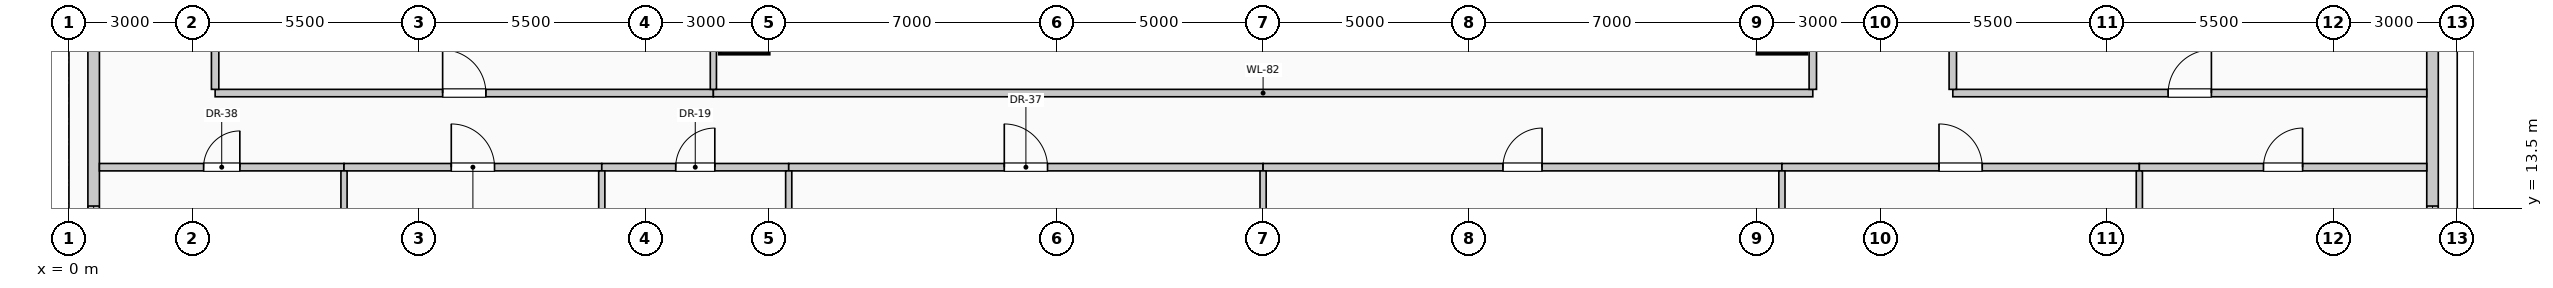
"""IFC4 building model, lengths in metres.
Left out: names, types, materials, properties, quantities, classifications, styles, units other than length and angle.
Written with IfcOpenShell. Run it as: python <this file> out.ifc"""

import sys

from ifc_helpers import new_model, si_unit, direction, frame, frame_2d, origin, origin_2d, place, context, subcontext, project, spatial, rectangle, extrude, element, fill, save


model = new_model("IFC4")
c1 = context("Model", 3, precision=1e-05, world=origin(), true_north=direction((0.0, 1.0)))
c2 = subcontext(c1, "Body", "Model", "MODEL_VIEW")
j1 = project(units=[si_unit("LENGTHUNIT", "METRE"), si_unit("PLANEANGLEUNIT", "RADIAN")], contexts=[c1])
p1 = place(None, origin())
s1 = spatial("IfcSite", under=j1, at=p1, CompositionType="ELEMENT")
p2 = place(p1, origin())
s2 = spatial("IfcBuilding", under=s1, at=p2, CompositionType="ELEMENT")
p3 = place(p2, frame((0.0, 0.0, 50.6)))
s3 = spatial("IfcBuildingStorey", under=s2, at=p3, CompositionType="ELEMENT", Elevation=50.6)
for number, where, z_axis, x_axis in (
    (1, (16.4, 18.0, 0.0), (0.0, 0.0, 1.0), (1.0, 0.0, 0.0)),
    (2, (41.6, 18.0, 0.0), (0.0, 0.0, 1.0), (1.0, 0.0, 0.0)),
):
    element("IfcColumn", number, at=place(p3, frame(where, z_axis=z_axis, x_axis=x_axis)), inside=s3, PredefinedType="COLUMN", context=c2, shape_type="SweptSolid", body=[
        extrude(rectangle(XDim=1.2, YDim=1.5, at=origin_2d()), origin(), (0.0, 0.0, 1.0), 4.0),
    ])
p4 = place(p3, frame((0.6, 10.47, 0.0), z_axis=(0.0, 0.0, 1.0), x_axis=(0.0, 1.0, 0.0)))
e3 = element("IfcWall", 3, at=p4, inside=s3, PredefinedType="SOLIDWALL", context=c2, shape_type="SweptSolid", body=[
    extrude(rectangle(XDim=7.06, YDim=0.28, at=frame_2d((3.53, 0.0))), origin(), (0.0, 0.0, 1.0), 2.85),
])
p5 = place(p4, frame((0.887, 0.0, 0.5)))
e4 = element("IfcOpeningElement", 4, at=p5, cuts=e3, PredefinedType="OPENING", context=c2, shape_type="SweptSolid", body=[
    extrude(rectangle(XDim=2.2, YDim=1.95, at=frame_2d((1.1, 0.975))), frame((0.0, 0.15, 0.0), z_axis=(0.0, -1.0, 0.0), x_axis=(1.0, 0.0, 0.0)), (0.0, 0.0, 1.0), 0.3),
])
p6 = place(p3, frame((57.4, 17.53, 0.0), z_axis=(0.0, 0.0, 1.0), x_axis=(0.0, -1.0, 0.0)))
e5 = element("IfcWall", 5, at=p6, inside=s3, PredefinedType="SOLIDWALL", context=c2, shape_type="SweptSolid", body=[
    extrude(rectangle(XDim=7.06, YDim=0.28, at=frame_2d((3.53, 0.0))), origin(), (0.0, 0.0, 1.0), 2.85),
])
p7 = place(p6, frame((3.973, 0.0, 0.5)))
e6 = element("IfcOpeningElement", 6, at=p7, cuts=e5, PredefinedType="OPENING", context=c2, shape_type="SweptSolid", body=[
    extrude(rectangle(XDim=2.2, YDim=1.95, at=frame_2d((1.1, 0.975))), frame((0.0, 0.15, 0.0), z_axis=(0.0, -1.0, 0.0), x_axis=(1.0, 0.0, 0.0)), (0.0, 0.0, 1.0), 0.3),
])
p8 = place(p3, frame((0.74, 14.5, 0.0), z_axis=(0.0, 0.0, 1.0), x_axis=(1.0, 0.0, 0.0)))
e7 = element("IfcWall", 7, at=p8, inside=s3, PredefinedType="PARTITIONING", context=c2, shape_type="SweptSolid", body=[
    extrude(rectangle(XDim=5.94, YDim=0.18, at=frame_2d((2.97, 0.0))), origin(), (0.0, 0.0, 1.0), 3.7),
])
p9 = place(p8, frame((2.53, 0.0, 0.0)))
e8 = element("IfcOpeningElement", 8, at=p9, cuts=e7, PredefinedType="OPENING", context=c2, shape_type="SweptSolid", body=[
    extrude(rectangle(XDim=0.88, YDim=2.1, at=frame_2d((0.44, 1.05))), frame((0.0, 0.1, 0.0), z_axis=(0.0, -1.0, 0.0), x_axis=(1.0, 0.0, 0.0)), (0.0, 0.0, 1.0), 0.2),
])
p10 = place(p3, frame((6.68, 14.5, 0.0), z_axis=(0.0, 0.0, 1.0), x_axis=(1.0, 0.0, 0.0)))
e9 = element("IfcWall", 9, at=p10, inside=s3, PredefinedType="PARTITIONING", context=c2, shape_type="SweptSolid", body=[
    extrude(rectangle(XDim=6.26, YDim=0.18, at=frame_2d((3.13, 0.0))), origin(), (0.0, 0.0, 1.0), 3.7),
])
p11 = place(p10, frame((2.605, 0.0, 0.0)))
e10 = element("IfcOpeningElement", 10, at=p11, cuts=e9, PredefinedType="OPENING", context=c2, shape_type="SweptSolid", body=[
    extrude(rectangle(XDim=1.05, YDim=2.15, at=frame_2d((0.525, 1.075))), frame((0.0, 0.1, 0.0), z_axis=(0.0, -1.0, 0.0), x_axis=(1.0, 0.0, 0.0)), (0.0, 0.0, 1.0), 0.2),
])
p12 = place(p3, frame((12.94, 14.5, 0.0), z_axis=(0.0, 0.0, 1.0), x_axis=(1.0, 0.0, 0.0)))
e11 = element("IfcWall", 11, at=p12, inside=s3, PredefinedType="PARTITIONING", context=c2, shape_type="SweptSolid", body=[
    extrude(rectangle(XDim=4.54, YDim=0.18, at=frame_2d((2.27, 0.0))), origin(), (0.0, 0.0, 1.0), 3.7),
])
p13 = place(p12, frame((1.795, 0.0, 0.0)))
e12 = element("IfcOpeningElement", 12, at=p13, cuts=e11, PredefinedType="OPENING", context=c2, shape_type="SweptSolid", body=[
    extrude(rectangle(XDim=0.95, YDim=2.15, at=frame_2d((0.475, 1.075))), frame((0.0, 0.1, 0.0), z_axis=(0.0, -1.0, 0.0), x_axis=(1.0, 0.0, 0.0)), (0.0, 0.0, 1.0), 0.2),
])
p14 = place(p3, frame((17.48, 14.5, 0.0), z_axis=(0.0, 0.0, 1.0), x_axis=(1.0, 0.0, 0.0)))
e13 = element("IfcWall", 13, at=p14, inside=s3, PredefinedType="PARTITIONING", context=c2, shape_type="SweptSolid", body=[
    extrude(rectangle(XDim=11.52, YDim=0.18, at=frame_2d((5.76, 0.0))), origin(), (0.0, 0.0, 1.0), 3.7),
])
p15 = place(p14, frame((5.235, 0.0, 0.0)))
e14 = element("IfcOpeningElement", 14, at=p15, cuts=e13, PredefinedType="OPENING", context=c2, shape_type="SweptSolid", body=[
    extrude(rectangle(XDim=1.05, YDim=2.15, at=frame_2d((0.525, 1.075))), frame((0.0, 0.1, 0.0), z_axis=(0.0, -1.0, 0.0), x_axis=(1.0, 0.0, 0.0)), (0.0, 0.0, 1.0), 0.2),
])
p16 = place(p3, frame((29.0, 14.5, 0.0), z_axis=(0.0, 0.0, 1.0), x_axis=(1.0, 0.0, 0.0)))
e15 = element("IfcWall", 15, at=p16, inside=s3, PredefinedType="PARTITIONING", context=c2, shape_type="SweptSolid", body=[
    extrude(rectangle(XDim=12.6, YDim=0.18, at=frame_2d((6.3, 0.0))), origin(), (0.0, 0.0, 1.0), 3.7),
])
p17 = place(p16, frame((5.825, 0.0, 0.0)))
e16 = element("IfcOpeningElement", 16, at=p17, cuts=e15, PredefinedType="OPENING", context=c2, shape_type="SweptSolid", body=[
    extrude(rectangle(XDim=0.95, YDim=2.15, at=frame_2d((0.475, 1.075))), frame((0.0, 0.1, 0.0), z_axis=(0.0, -1.0, 0.0), x_axis=(1.0, 0.0, 0.0)), (0.0, 0.0, 1.0), 0.2),
])
p18 = place(p3, frame((41.6, 14.5, 0.0), z_axis=(0.0, 0.0, 1.0), x_axis=(1.0, 0.0, 0.0)))
e17 = element("IfcWall", 17, at=p18, inside=s3, PredefinedType="PARTITIONING", context=c2, shape_type="SweptSolid", body=[
    extrude(rectangle(XDim=8.68, YDim=0.18, at=frame_2d((4.34, 0.0))), origin(), (0.0, 0.0, 1.0), 3.7),
])
p19 = place(p18, frame((3.815, 0.0, 0.0)))
e18 = element("IfcOpeningElement", 18, at=p19, cuts=e17, PredefinedType="OPENING", context=c2, shape_type="SweptSolid", body=[
    extrude(rectangle(XDim=1.05, YDim=2.15, at=frame_2d((0.525, 1.075))), frame((0.0, 0.1, 0.0), z_axis=(0.0, -1.0, 0.0), x_axis=(1.0, 0.0, 0.0)), (0.0, 0.0, 1.0), 0.2),
])
p20 = place(p3, frame((50.28, 14.5, 0.0), z_axis=(0.0, 0.0, 1.0), x_axis=(1.0, 0.0, 0.0)))
e19 = element("IfcWall", 19, at=p20, inside=s3, PredefinedType="PARTITIONING", context=c2, shape_type="SweptSolid", body=[
    extrude(rectangle(XDim=6.98, YDim=0.18, at=frame_2d((3.49, 0.0))), origin(), (0.0, 0.0, 1.0), 3.7),
])
p21 = place(p20, frame((3.015, 0.0, 0.0)))
e20 = element("IfcOpeningElement", 20, at=p21, cuts=e19, PredefinedType="OPENING", context=c2, shape_type="SweptSolid", body=[
    extrude(rectangle(XDim=0.95, YDim=2.15, at=frame_2d((0.475, 1.075))), frame((0.0, 0.1, 0.0), z_axis=(0.0, -1.0, 0.0), x_axis=(1.0, 0.0, 0.0)), (0.0, 0.0, 1.0), 0.2),
])
p22 = place(p3, frame((3.55, 16.3, 0.0), z_axis=(0.0, 0.0, 1.0), x_axis=(1.0, 0.0, 0.0)))
e21 = element("IfcWall", 21, at=p22, inside=s3, PredefinedType="PARTITIONING", context=c2, shape_type="SweptSolid", body=[
    extrude(rectangle(XDim=12.1, YDim=0.18, at=frame_2d((6.05, 0.0))), origin(), (0.0, 0.0, 1.0), 3.7),
])
p23 = place(p22, frame((5.525, 0.0, 0.0)))
e22 = element("IfcOpeningElement", 22, at=p23, cuts=e21, PredefinedType="OPENING", context=c2, shape_type="SweptSolid", body=[
    extrude(rectangle(XDim=1.05, YDim=2.15, at=frame_2d((0.525, 1.075))), frame((0.0, 0.1, 0.0), z_axis=(0.0, -1.0, 0.0), x_axis=(1.0, 0.0, 0.0)), (0.0, 0.0, 1.0), 0.2),
])
p24 = place(p3, frame((15.65, 16.3, 0.0), z_axis=(0.0, 0.0, 1.0), x_axis=(1.0, 0.0, 0.0)))
e23 = element("IfcWall", 23, at=p24, inside=s3, PredefinedType="PARTITIONING", context=c2, shape_type="SweptSolid", body=[
    extrude(rectangle(XDim=26.7, YDim=0.18, at=frame_2d((13.35, 0.0))), origin(), (0.0, 0.0, 1.0), 3.7),
])
p25 = place(p3, frame((45.75, 16.3, 0.0), z_axis=(0.0, 0.0, 1.0), x_axis=(1.0, 0.0, 0.0)))
e24 = element("IfcWall", 24, at=p25, inside=s3, PredefinedType="PARTITIONING", context=c2, shape_type="SweptSolid", body=[
    extrude(rectangle(XDim=11.51, YDim=0.18, at=frame_2d((5.755, 0.0))), origin(), (0.0, 0.0, 1.0), 3.7),
])
p26 = place(p25, frame((5.23, 0.0, 0.0)))
e25 = element("IfcOpeningElement", 25, at=p26, cuts=e24, PredefinedType="OPENING", context=c2, shape_type="SweptSolid", body=[
    extrude(rectangle(XDim=1.05, YDim=2.15, at=frame_2d((0.525, 1.075))), frame((0.0, 0.1, 0.0), z_axis=(0.0, -1.0, 0.0), x_axis=(1.0, 0.0, 0.0)), (0.0, 0.0, 1.0), 0.2),
])
p27 = place(p3, frame((3.55, 16.39, 0.0), z_axis=(0.0, 0.0, 1.0), x_axis=(0.0, 1.0, 0.0)))
e26 = element("IfcWall", 26, at=p27, inside=s3, PredefinedType="PARTITIONING", context=c2, shape_type="SweptSolid", body=[
    extrude(rectangle(XDim=3.17, YDim=0.18, at=frame_2d((1.585, 0.0))), origin(), (0.0, 0.0, 1.0), 3.7),
])
for number, where, z_axis, x_axis in (
    (27, (6.68, 0.74, 0.0), (0.0, 0.0, 1.0), (0.0, 1.0, 0.0)),
    (28, (12.94, 0.74, 0.0), (0.0, 0.0, 1.0), (0.0, 1.0, 0.0)),
):
    element("IfcWall", number, at=place(p3, frame(where, z_axis=z_axis, x_axis=x_axis)), inside=s3, PredefinedType="PARTITIONING", context=c2, shape_type="SweptSolid", body=[
        extrude(rectangle(XDim=13.67, YDim=0.15, at=frame_2d((6.835, 0.0))), origin(), (0.0, 0.0, 1.0), 3.7),
    ])
p28 = place(p3, frame((15.65, 16.39, 0.0), z_axis=(0.0, 0.0, 1.0), x_axis=(0.0, 1.0, 0.0)))
e29 = element("IfcWall", 29, at=p28, inside=s3, PredefinedType="PARTITIONING", context=c2, shape_type="SweptSolid", body=[
    extrude(rectangle(XDim=3.17, YDim=0.15, at=frame_2d((1.585, 0.0))), origin(), (0.0, 0.0, 1.0), 3.7),
])
p29 = place(p3, frame((17.48, 0.74, 0.0), z_axis=(0.0, 0.0, 1.0), x_axis=(0.0, 1.0, 0.0)))
e30 = element("IfcWall", 30, at=p29, inside=s3, PredefinedType="PARTITIONING", context=c2, shape_type="SweptSolid", body=[
    extrude(rectangle(XDim=13.67, YDim=0.15, at=frame_2d((6.835, 0.0))), origin(), (0.0, 0.0, 1.0), 3.7),
])
p30 = place(p3, frame((29.0, 1.2, 0.0), z_axis=(0.0, 0.0, 1.0), x_axis=(0.0, 1.0, 0.0)))
e31 = element("IfcWall", 31, at=p30, inside=s3, PredefinedType="PARTITIONING", context=c2, shape_type="SweptSolid", body=[
    extrude(rectangle(XDim=13.21, YDim=0.15, at=frame_2d((6.605, 0.0))), origin(), (0.0, 0.0, 1.0), 2.995),
])
p31 = place(p3, frame((41.6, 10.75, 0.0), z_axis=(0.0, 0.0, 1.0), x_axis=(0.0, 1.0, 0.0)))
e32 = element("IfcWall", 32, at=p31, inside=s3, PredefinedType="PARTITIONING", context=c2, shape_type="SweptSolid", body=[
    extrude(rectangle(XDim=3.66, YDim=0.15, at=frame_2d((1.83, 0.0))), origin(), (0.0, 0.0, 1.0), 2.995),
])
for number, where, z_axis, x_axis in (
    (33, (42.35, 16.39, 0.0), (0.0, 0.0, 1.0), (0.0, 1.0, 0.0)),
    (34, (45.75, 16.39, 0.0), (0.0, 0.0, 1.0), (0.0, 1.0, 0.0)),
):
    element("IfcWall", number, at=place(p3, frame(where, z_axis=z_axis, x_axis=x_axis)), inside=s3, PredefinedType="PARTITIONING", context=c2, shape_type="SweptSolid", body=[
        extrude(rectangle(XDim=3.17, YDim=0.18, at=frame_2d((1.585, 0.0))), origin(), (0.0, 0.0, 1.0), 3.7),
    ])
p32 = place(p3, frame((50.28, 0.74, 0.0), z_axis=(0.0, 0.0, 1.0), x_axis=(0.0, 1.0, 0.0)))
e35 = element("IfcWall", 35, at=p32, inside=s3, PredefinedType="PARTITIONING", context=c2, shape_type="SweptSolid", body=[
    extrude(rectangle(XDim=13.67, YDim=0.15, at=frame_2d((6.835, 0.0))), origin(), (0.0, 0.0, 1.0), 3.7),
])
p33 = place(p5, origin())
e36 = element("IfcWindow", 36, at=p33, inside=s3, PartitioningType="SINGLE_PANEL", PredefinedType="WINDOW", context=c2, shape_type="SweptSolid", body=[
    extrude(rectangle(XDim=2.2, YDim=1.95, at=frame_2d((1.1, 0.975))), frame((0.0, 0.03, 0.0), z_axis=(0.0, -1.0, 0.0), x_axis=(1.0, 0.0, 0.0)), (0.0, 0.0, 1.0), 0.06),
])
fill(e4, e36)
p34 = place(p7, origin())
e37 = element("IfcWindow", 37, at=p34, inside=s3, PartitioningType="SINGLE_PANEL", PredefinedType="WINDOW", context=c2, shape_type="SweptSolid", body=[
    extrude(rectangle(XDim=2.2, YDim=1.95, at=frame_2d((1.1, 0.975))), frame((0.0, 0.03, 0.0), z_axis=(0.0, -1.0, 0.0), x_axis=(1.0, 0.0, 0.0)), (0.0, 0.0, 1.0), 0.06),
])
fill(e6, e37)
p35 = place(p9, origin())
e38 = element("IfcDoor", 38, at=p35, inside=s3, OperationType="SINGLE_SWING_RIGHT", PredefinedType="DOOR", context=c2, shape_type="SweptSolid", body=[
    extrude(rectangle(XDim=0.88, YDim=2.1, at=frame_2d((0.44, 1.05))), frame((0.0, 0.025, 0.0), z_axis=(0.0, -1.0, 0.0), x_axis=(1.0, 0.0, 0.0)), (0.0, 0.0, 1.0), 0.05),
])
fill(e8, e38)
p36 = place(p11, origin())
e39 = element("IfcDoor", 39, at=p36, inside=s3, OperationType="SINGLE_SWING_LEFT", PredefinedType="DOOR", context=c2, shape_type="SweptSolid", body=[
    extrude(rectangle(XDim=1.05, YDim=2.15, at=frame_2d((0.525, 1.075))), frame((0.0, 0.025, 0.0), z_axis=(0.0, -1.0, 0.0), x_axis=(1.0, 0.0, 0.0)), (0.0, 0.0, 1.0), 0.05),
])
fill(e10, e39)
p37 = place(p13, origin())
e40 = element("IfcDoor", 40, at=p37, inside=s3, OperationType="SINGLE_SWING_RIGHT", PredefinedType="DOOR", context=c2, shape_type="SweptSolid", body=[
    extrude(rectangle(XDim=0.95, YDim=2.15, at=frame_2d((0.475, 1.075))), frame((0.0, 0.025, 0.0), z_axis=(0.0, -1.0, 0.0), x_axis=(1.0, 0.0, 0.0)), (0.0, 0.0, 1.0), 0.05),
])
fill(e12, e40)
p38 = place(p15, origin())
e41 = element("IfcDoor", 41, at=p38, inside=s3, OperationType="SINGLE_SWING_LEFT", PredefinedType="DOOR", context=c2, shape_type="SweptSolid", body=[
    extrude(rectangle(XDim=1.05, YDim=2.15, at=frame_2d((0.525, 1.075))), frame((0.0, 0.025, 0.0), z_axis=(0.0, -1.0, 0.0), x_axis=(1.0, 0.0, 0.0)), (0.0, 0.0, 1.0), 0.05),
])
fill(e14, e41)
p39 = place(p17, origin())
e42 = element("IfcDoor", 42, at=p39, inside=s3, OperationType="SINGLE_SWING_RIGHT", PredefinedType="DOOR", context=c2, shape_type="SweptSolid", body=[
    extrude(rectangle(XDim=0.95, YDim=2.15, at=frame_2d((0.475, 1.075))), frame((0.0, 0.025, 0.0), z_axis=(0.0, -1.0, 0.0), x_axis=(1.0, 0.0, 0.0)), (0.0, 0.0, 1.0), 0.05),
])
fill(e16, e42)
p40 = place(p19, origin())
e43 = element("IfcDoor", 43, at=p40, inside=s3, OperationType="SINGLE_SWING_LEFT", PredefinedType="DOOR", context=c2, shape_type="SweptSolid", body=[
    extrude(rectangle(XDim=1.05, YDim=2.15, at=frame_2d((0.525, 1.075))), frame((0.0, 0.025, 0.0), z_axis=(0.0, -1.0, 0.0), x_axis=(1.0, 0.0, 0.0)), (0.0, 0.0, 1.0), 0.05),
])
fill(e18, e43)
p41 = place(p21, origin())
e44 = element("IfcDoor", 44, at=p41, inside=s3, OperationType="SINGLE_SWING_RIGHT", PredefinedType="DOOR", context=c2, shape_type="SweptSolid", body=[
    extrude(rectangle(XDim=0.95, YDim=2.15, at=frame_2d((0.475, 1.075))), frame((0.0, 0.025, 0.0), z_axis=(0.0, -1.0, 0.0), x_axis=(1.0, 0.0, 0.0)), (0.0, 0.0, 1.0), 0.05),
])
fill(e20, e44)
p42 = place(p23, origin())
e45 = element("IfcDoor", 45, at=p42, inside=s3, OperationType="SINGLE_SWING_LEFT", PredefinedType="DOOR", context=c2, shape_type="SweptSolid", body=[
    extrude(rectangle(XDim=1.05, YDim=2.15, at=frame_2d((0.525, 1.075))), frame((0.0, 0.025, 0.0), z_axis=(0.0, -1.0, 0.0), x_axis=(1.0, 0.0, 0.0)), (0.0, 0.0, 1.0), 0.05),
])
fill(e22, e45)
p43 = place(p26, origin())
e46 = element("IfcDoor", 46, at=p43, inside=s3, OperationType="SINGLE_SWING_RIGHT", PredefinedType="DOOR", context=c2, shape_type="SweptSolid", body=[
    extrude(rectangle(XDim=1.05, YDim=2.15, at=frame_2d((0.525, 1.075))), frame((0.0, 0.025, 0.0), z_axis=(0.0, -1.0, 0.0), x_axis=(1.0, 0.0, 0.0)), (0.0, 0.0, 1.0), 0.05),
])
fill(e25, e46)
save(model, sys.argv[1])
